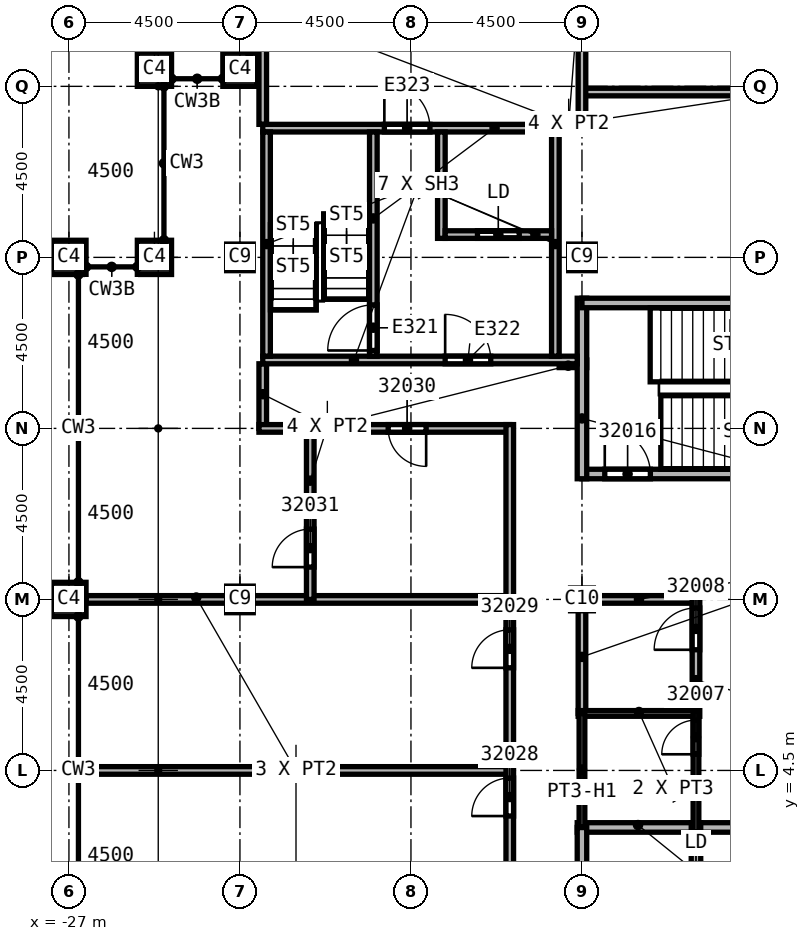
"""IFC4 building model, lengths in metres.
Left out: names, types, materials, properties, quantities, classifications, styles, units other than length and angle.
Written with IfcOpenShell. Run it as: python <this file> out.ifc"""

import sys

from ifc_helpers import new_model, si_unit, direction, frame, frame_2d, origin, origin_2d, place, context, subcontext, project, spatial, rectangle, extrude, element, fill, save


model = new_model("IFC4")
c1 = context("Model", 3, precision=1e-05, world=origin(), true_north=direction((0.0, 1.0)))
c2 = subcontext(c1, "Body", "Model", "MODEL_VIEW")
j1 = project(units=[si_unit("LENGTHUNIT", "METRE"), si_unit("PLANEANGLEUNIT", "RADIAN")], contexts=[c1])
p1 = place(None, origin())
s1 = spatial("IfcSite", under=j1, at=p1, CompositionType="ELEMENT")
p2 = place(p1, origin())
s2 = spatial("IfcBuilding", under=s1, at=p2, CompositionType="ELEMENT")
p3 = place(p2, frame((0.0, 0.0, 356.0)))
s3 = spatial("IfcBuildingStorey", under=s2, at=p3, CompositionType="ELEMENT", Elevation=356.0)
for number, where, z_axis, x_axis in (
    (1, (-13.5, 18.0, 0.0), (0.0, 0.0, 1.0), (1.0, 0.0, 0.0)),
    (2, (-22.5, 9.0, 0.0), (0.0, 0.0, 1.0), (1.0, 0.0, 0.0)),
    (3, (-22.5, 18.0, 0.0), (0.0, 0.0, 1.0), (1.0, 0.0, 0.0)),
):
    element("IfcColumn", number, at=place(p3, frame(where, z_axis=z_axis, x_axis=x_axis)), inside=s3, PredefinedType="COLUMN", context=c2, shape_type="SweptSolid", body=[
        extrude(rectangle(XDim=0.7, YDim=0.7, at=origin_2d()), origin(), (0.0, 0.0, 1.0), 4.6),
    ])
p4 = place(p3, frame((-13.5, 9.0, 0.0), z_axis=(0.0, 0.0, 1.0), x_axis=(1.0, 0.0, 0.0)))
e4 = element("IfcColumn", 4, at=p4, inside=s3, PredefinedType="COLUMN", context=c2, shape_type="SweptSolid", body=[
    extrude(rectangle(XDim=0.6, YDim=0.6, at=origin_2d()), origin(), (0.0, 0.0, 1.0), 4.6),
])
for number, where, z_axis, x_axis in (
    (5, (-27.0, 9.0, 0.0), (0.0, 0.0, 1.0), (0.0, 1.0, 0.0)),
    (6, (-27.0, 18.0, 0.0), (0.0, 0.0, 1.0), (0.0, 1.0, 0.0)),
    (7, (-22.5, 22.95, 0.0), (0.0, 0.0, 1.0), (1.0, 0.0, 0.0)),
    (8, (-24.75, 22.95, 0.0), (0.0, 0.0, 1.0), (1.0, 0.0, 0.0)),
    (9, (-24.75, 18.0, 0.0), (0.0, 0.0, 1.0), (1.0, 0.0, 0.0)),
):
    element("IfcColumn", number, at=place(p3, frame(where, z_axis=z_axis, x_axis=x_axis)), inside=s3, PredefinedType="COLUMN", context=c2, shape_type="SweptSolid", body=[
        extrude(rectangle(XDim=0.9, YDim=0.9, at=origin_2d()), origin(), (0.0, 0.0, 1.0), 4.6),
    ])
for number, where, z_axis, x_axis in (
    (10, (-26.55, 4.5, 0.0), (0.0, 0.0, 1.0), (1.0, 0.0, 0.0)),
    (11, (-26.55, 9.0, 0.0), (0.0, 0.0, 1.0), (1.0, 0.0, 0.0)),
):
    element("IfcWall", number, at=place(p3, frame(where, z_axis=z_axis, x_axis=x_axis)), inside=s3, PredefinedType="PARTITIONING", context=c2, shape_type="SweptSolid", body=[
        extrude(rectangle(XDim=11.15, YDim=0.2, at=frame_2d((5.575, 0.0))), origin(), (0.0, 0.0, 1.0), 4.15),
    ])
p5 = place(p3, frame((-21.9, 13.5, 0.0), z_axis=(0.0, 0.0, 1.0), x_axis=(0.0, 1.0, 0.0)))
e12 = element("IfcWall", 12, at=p5, inside=s3, PredefinedType="PARTITIONING", context=c2, shape_type="SweptSolid", body=[
    extrude(rectangle(XDim=1.7, YDim=0.2, at=frame_2d((0.85, 0.0))), origin(), (0.0, 0.0, 1.0), 4.15),
])
p6 = place(p3, frame((-21.9, 21.5, 0.0), z_axis=(0.0, 0.0, 1.0), x_axis=(0.0, 1.0, 0.0)))
e13 = element("IfcWall", 13, at=p6, inside=s3, PredefinedType="PARTITIONING", context=c2, shape_type="SweptSolid", body=[
    extrude(rectangle(XDim=6.136, YDim=0.2, at=frame_2d((3.068, 0.0))), origin(), (0.0, 0.0, 1.0), 4.15),
])
p7 = place(p3, frame((-20.65, 9.0, 0.0), z_axis=(0.0, 0.0, 1.0), x_axis=(0.0, 1.0, 0.0)))
e14 = element("IfcWall", 14, at=p7, inside=s3, PredefinedType="PARTITIONING", context=c2, shape_type="SweptSolid", body=[
    extrude(rectangle(XDim=4.5, YDim=0.2, at=frame_2d((2.25, 0.0))), origin(), (0.0, 0.0, 1.0), 4.15),
])
p8 = place(p7, frame((0.85, 0.0, 0.0)))
e15 = element("IfcOpeningElement", 15, at=p8, cuts=e14, PredefinedType="OPENING", context=c2, shape_type="SweptSolid", body=[
    extrude(rectangle(XDim=1.0, YDim=2.1, at=frame_2d((0.5, 1.05))), frame((0.0, 0.1, 0.0), z_axis=(0.0, -1.0, 0.0), x_axis=(1.0, 0.0, 0.0)), (0.0, 0.0, 1.0), 0.2),
])
p9 = place(p3, frame((-15.4, 13.5, 0.0), z_axis=(0.0, 0.0, 1.0), x_axis=(-1.0, 0.0, 0.0)))
e16 = element("IfcWall", 16, at=p9, inside=s3, PredefinedType="PARTITIONING", context=c2, shape_type="SweptSolid", body=[
    extrude(rectangle(XDim=6.6, YDim=0.2, at=frame_2d((3.3, 0.0))), origin(), (0.0, 0.0, 1.0), 4.15),
])
p10 = place(p9, frame((2.2, 0.0, 0.0)))
e17 = element("IfcOpeningElement", 17, at=p10, cuts=e16, PredefinedType="OPENING", context=c2, shape_type="SweptSolid", body=[
    extrude(rectangle(XDim=1.0, YDim=2.1, at=frame_2d((0.5, 1.05))), frame((0.0, 0.1, 0.0), z_axis=(0.0, -1.0, 0.0), x_axis=(1.0, 0.0, 0.0)), (0.0, 0.0, 1.0), 0.2),
])
p11 = place(p3, frame((-15.4, -27.636, 0.0), z_axis=(0.0, 0.0, 1.0), x_axis=(0.0, 1.0, 0.0)))
e18 = element("IfcWall", 18, at=p11, inside=s3, PredefinedType="PARTITIONING", context=c2, shape_type="SweptSolid", body=[
    extrude(rectangle(XDim=41.236, YDim=0.2, at=frame_2d((20.618, 0.0))), origin(), (0.0, 0.0, 1.0), 4.15),
])
p12 = place(p11, frame((30.936, 0.0, 0.0)))
e19 = element("IfcOpeningElement", 19, at=p12, cuts=e18, PredefinedType="OPENING", context=c2, shape_type="SweptSolid", body=[
    extrude(rectangle(XDim=1.0, YDim=2.1, at=frame_2d((0.5, 1.05))), frame((0.0, 0.1, 0.0), z_axis=(0.0, -1.0, 0.0), x_axis=(1.0, 0.0, 0.0)), (0.0, 0.0, 1.0), 0.2),
])
p13 = place(p11, frame((34.836, 0.0, 0.0)))
e20 = element("IfcOpeningElement", 20, at=p13, cuts=e18, PredefinedType="OPENING", context=c2, shape_type="SweptSolid", body=[
    extrude(rectangle(XDim=1.0, YDim=2.1, at=frame_2d((0.5, 1.05))), frame((0.0, 0.1, 0.0), z_axis=(0.0, -1.0, 0.0), x_axis=(1.0, 0.0, 0.0)), (0.0, 0.0, 1.0), 0.2),
])
p14 = place(p11, frame((8.2, 0.0, 0.0)))
e21 = element("IfcOpeningElement", 21, at=p14, cuts=e18, PredefinedType="OPENING", context=c2, shape_type="SweptSolid", body=[
    extrude(rectangle(XDim=1.0, YDim=2.1, at=frame_2d((0.5, 1.05))), frame((0.0, 0.1, 0.0), z_axis=(0.0, -1.0, 0.0), x_axis=(1.0, 0.0, 0.0)), (0.0, 0.0, 1.0), 0.2),
])
p15 = place(p11, frame((22.986, 0.0, 0.0)))
e22 = element("IfcOpeningElement", 22, at=p15, cuts=e18, PredefinedType="OPENING", context=c2, shape_type="SweptSolid", body=[
    extrude(rectangle(XDim=1.0, YDim=2.1, at=frame_2d((0.5, 1.05))), frame((0.0, 0.1, 0.0), z_axis=(0.0, -1.0, 0.0), x_axis=(1.0, 0.0, 0.0)), (0.0, 0.0, 1.0), 0.2),
])
p16 = place(p11, frame((26.361, 0.0, 0.0)))
e23 = element("IfcOpeningElement", 23, at=p16, cuts=e18, PredefinedType="OPENING", context=c2, shape_type="SweptSolid", body=[
    extrude(rectangle(XDim=1.0, YDim=2.1, at=frame_2d((0.5, 1.05))), frame((0.0, 0.1, 0.0), z_axis=(0.0, -1.0, 0.0), x_axis=(1.0, 0.0, 0.0)), (0.0, 0.0, 1.0), 0.2),
])
p17 = place(p3, frame((-14.1, 15.2, 0.0), z_axis=(0.0, 0.0, 1.0), x_axis=(1.0, 0.0, 0.0)))
e24 = element("IfcWall", 24, at=p17, inside=s3, PredefinedType="PARTITIONING", context=c2, shape_type="SweptSolid", body=[
    extrude(rectangle(XDim=0.725, YDim=0.2, at=frame_2d((0.363, 0.0))), origin(), (0.0, 0.0, 1.0), 4.15),
])
p18 = place(p3, frame((-13.5, 21.5, 0.0), z_axis=(0.0, 0.0, 1.0), x_axis=(-1.0, 0.0, 0.0)))
e25 = element("IfcWall", 25, at=p18, inside=s3, PredefinedType="PARTITIONING", context=c2, shape_type="SweptSolid", body=[
    extrude(rectangle(XDim=0.6, YDim=0.2, at=frame_2d((0.3, 0.0))), origin(), (0.0, 0.0, 1.0), 4.15),
])
p19 = place(p3, frame((-13.5, 22.35, 0.0), z_axis=(0.0, 0.0, 1.0), x_axis=(1.0, 0.0, 0.0)))
e26 = element("IfcWall", 26, at=p19, inside=s3, PredefinedType="PARTITIONING", context=c2, shape_type="SweptSolid", body=[
    extrude(rectangle(XDim=10.6, YDim=0.2, at=frame_2d((5.3, 0.0))), origin(), (0.0, 0.0, 1.0), 4.15),
])
p20 = place(p3, frame((-13.5, 27.45, 0.0), z_axis=(0.0, 0.0, 1.0), x_axis=(0.0, -1.0, 0.0)))
e27 = element("IfcWall", 27, at=p20, inside=s3, PredefinedType="PARTITIONING", context=c2, shape_type="SweptSolid", body=[
    extrude(rectangle(XDim=6.05, YDim=0.2, at=frame_2d((3.025, 0.0))), origin(), (0.0, 0.0, 1.0), 4.15),
])
p21 = place(p20, frame((2.95, 0.0, 0.0)))
e28 = element("IfcOpeningElement", 28, at=p21, cuts=e27, PredefinedType="OPENING", context=c2, shape_type="SweptSolid", body=[
    extrude(rectangle(XDim=1.0, YDim=2.1, at=frame_2d((0.5, 1.05))), frame((0.0, 0.1, 0.0), z_axis=(0.0, -1.0, 0.0), x_axis=(1.0, 0.0, 0.0)), (0.0, 0.0, 1.0), 0.2),
])
p22 = place(p3, frame((-13.5, 6.0, 0.0), z_axis=(0.0, 0.0, 1.0), x_axis=(0.0, 1.0, 0.0)))
e29 = element("IfcWall", 29, at=p22, inside=s3, PredefinedType="SOLIDWALL", context=c2, shape_type="SweptSolid", body=[
    extrude(rectangle(XDim=3.1, YDim=0.2, at=frame_2d((1.55, 0.0))), origin(), (0.0, 0.0, 1.0), 3.838),
])
p23 = place(p3, frame((-13.5, 9.0, 0.0), z_axis=(0.0, 0.0, 1.0), x_axis=(1.0, 0.0, 0.0)))
e30 = element("IfcWall", 30, at=p23, inside=s3, PredefinedType="SOLIDWALL", context=c2, shape_type="SweptSolid", body=[
    extrude(rectangle(XDim=3.0, YDim=0.2, at=frame_2d((1.5, 0.0))), origin(), (0.0, 0.0, 1.0), 3.838),
])
p24 = place(p3, frame((-10.5, 5.925, 0.0), z_axis=(0.0, 0.0, 1.0), x_axis=(0.0, 1.0, 0.0)))
e31 = element("IfcWall", 31, at=p24, inside=s3, PredefinedType="SOLIDWALL", context=c2, shape_type="SweptSolid", body=[
    extrude(rectangle(XDim=3.175, YDim=0.2, at=frame_2d((1.587, 0.0))), origin(), (0.0, 0.0, 1.0), 4.15),
])
p25 = place(p24, frame((1.75, 0.0, 0.0)))
e32 = element("IfcOpeningElement", 32, at=p25, cuts=e31, PredefinedType="OPENING", context=c2, shape_type="SweptSolid", body=[
    extrude(rectangle(XDim=1.1, YDim=2.1, at=frame_2d((0.55, 1.05))), frame((0.0, 0.1, 0.0), z_axis=(0.0, -1.0, 0.0), x_axis=(1.0, 0.0, 0.0)), (0.0, 0.0, 1.0), 0.2),
])
p26 = place(p3, frame((-13.625, 3.0, 0.0), z_axis=(0.0, 0.0, 1.0), x_axis=(1.0, 0.0, 0.0)))
e33 = element("IfcWall", 33, at=p26, inside=s3, PredefinedType="SOLIDWALL", context=c2, shape_type="SweptSolid", body=[
    extrude(rectangle(XDim=6.125, YDim=0.25, at=frame_2d((3.062, 0.0))), origin(), (0.0, 0.0, 1.0), 4.15),
])
p27 = place(p26, frame((4.75, 0.0, 0.0)))
e34 = element("IfcOpeningElement", 34, at=p27, cuts=e33, PredefinedType="OPENING", context=c2, shape_type="SweptSolid", body=[
    extrude(rectangle(XDim=1.1, YDim=2.1, at=frame_2d((0.55, 1.05))), frame((0.0, 0.125, 0.0), z_axis=(0.0, -1.0, 0.0), x_axis=(1.0, 0.0, 0.0)), (0.0, 0.0, 1.0), 0.25),
])
p28 = place(p3, frame((-13.5, -3.0, 0.0), z_axis=(0.0, 0.0, 1.0), x_axis=(0.0, 1.0, 0.0)))
e35 = element("IfcWall", 35, at=p28, inside=s3, PredefinedType="SOLIDWALL", context=c2, shape_type="SweptSolid", body=[
    extrude(rectangle(XDim=6.0, YDim=0.25, at=frame_2d((3.0, 0.0))), origin(), (0.0, 0.0, 1.0), 3.838),
])
p29 = place(p3, frame((-10.5, -3.125, 0.0), z_axis=(0.0, 0.0, 1.0), x_axis=(0.0, 1.0, 0.0)))
e36 = element("IfcWall", 36, at=p29, inside=s3, PredefinedType="SOLIDWALL", context=c2, shape_type="SweptSolid", body=[
    extrude(rectangle(XDim=6.25, YDim=0.25, at=frame_2d((3.125, 0.0))), origin(), (0.0, 0.0, 1.0), 4.15),
])
p30 = place(p29, frame((1.075, 0.0, 0.0)))
e37 = element("IfcOpeningElement", 37, at=p30, cuts=e36, PredefinedType="OPENING", context=c2, shape_type="SweptSolid", body=[
    extrude(rectangle(XDim=1.1, YDim=2.1, at=frame_2d((0.55, 1.05))), frame((0.0, 0.125, 0.0), z_axis=(0.0, -1.0, 0.0), x_axis=(1.0, 0.0, 0.0)), (0.0, 0.0, 1.0), 0.25),
])
p31 = place(p29, frame((4.075, 0.0, 0.0)))
e38 = element("IfcOpeningElement", 38, at=p31, cuts=e36, PredefinedType="OPENING", context=c2, shape_type="SweptSolid", body=[
    extrude(rectangle(XDim=1.1, YDim=2.1, at=frame_2d((0.55, 1.05))), frame((0.0, 0.125, 0.0), z_axis=(0.0, -1.0, 0.0), x_axis=(1.0, 0.0, 0.0)), (0.0, 0.0, 1.0), 0.25),
])
p32 = place(p3, frame((-13.5, 12.3, 0.0), z_axis=(0.0, 0.0, 1.0), x_axis=(1.0, 0.0, 0.0)))
e39 = element("IfcWall", 39, at=p32, inside=s3, PredefinedType="SOLIDWALL", context=c2, shape_type="SweptSolid", body=[
    extrude(rectangle(XDim=9.125, YDim=0.25, at=frame_2d((4.562, 0.0))), origin(), (0.0, 0.0, 1.0), 4.15),
])
p33 = place(p32, frame((0.6, 0.0, 0.0)))
e40 = element("IfcOpeningElement", 40, at=p33, cuts=e39, PredefinedType="OPENING", context=c2, shape_type="SweptSolid", body=[
    extrude(rectangle(XDim=1.2, YDim=2.1, at=frame_2d((0.6, 1.05))), frame((0.0, 0.125, 0.0), z_axis=(0.0, -1.0, 0.0), x_axis=(1.0, 0.0, 0.0)), (0.0, 0.0, 1.0), 0.25),
])
p34 = place(p3, frame((-13.5, 12.175, 0.0), z_axis=(0.0, 0.0, 1.0), x_axis=(0.0, 1.0, 0.0)))
e41 = element("IfcWall", 41, at=p34, inside=s3, PredefinedType="SOLIDWALL", context=c2, shape_type="SweptSolid", body=[
    extrude(rectangle(XDim=4.75, YDim=0.25, at=frame_2d((2.375, 0.0))), origin(), (0.0, 0.0, 1.0), 4.15),
])
p35 = place(p3, frame((-13.5, 16.8, 0.0), z_axis=(0.0, 0.0, 1.0), x_axis=(1.0, 0.0, 0.0)))
e42 = element("IfcWall", 42, at=p35, inside=s3, PredefinedType="SOLIDWALL", context=c2, shape_type="SweptSolid", body=[
    extrude(rectangle(XDim=9.1, YDim=0.25, at=frame_2d((4.55, 0.0))), origin(), (0.0, 0.0, 1.0), 4.15),
])
p36 = place(p3, frame((-13.6, 6.0, 0.0), z_axis=(0.0, 0.0, 1.0), x_axis=(1.0, 0.0, 0.0)))
e43 = element("IfcWall", 43, at=p36, inside=s3, PredefinedType="PARTITIONING", context=c2, shape_type="SweptSolid", body=[
    extrude(rectangle(XDim=3.1, YDim=0.15, at=frame_2d((1.55, 0.0))), origin(), (0.0, 0.0, 1.0), 4.15),
])
p37 = place(p3, frame((-13.5, 3.0, 0.0), z_axis=(0.0, 0.0, 1.0), x_axis=(0.0, 1.0, 0.0)))
e44 = element("IfcWall", 44, at=p37, inside=s3, PredefinedType="PARTITIONING", context=c2, shape_type="SweptSolid", body=[
    extrude(rectangle(XDim=3.0, YDim=0.15, at=frame_2d((1.5, 0.0))), origin(), (0.0, 0.0, 1.0), 3.838),
])
p38 = place(p3, frame((-10.5, 2.875, 0.0), z_axis=(0.0, 0.0, 1.0), x_axis=(0.0, 1.0, 0.0)))
e45 = element("IfcWall", 45, at=p38, inside=s3, PredefinedType="PARTITIONING", context=c2, shape_type="SweptSolid", body=[
    extrude(rectangle(XDim=3.2, YDim=0.15, at=frame_2d((1.6, 0.0))), origin(), (0.0, 0.0, 1.0), 4.15),
])
p39 = place(p38, frame((2.05, 0.0, 0.0)))
e46 = element("IfcOpeningElement", 46, at=p39, cuts=e45, PredefinedType="OPENING", context=c2, shape_type="SweptSolid", body=[
    extrude(rectangle(XDim=0.9, YDim=2.1, at=frame_2d((0.45, 1.05))), frame((0.0, 0.075, 0.0), z_axis=(0.0, -1.0, 0.0), x_axis=(1.0, 0.0, 0.0)), (0.0, 0.0, 1.0), 0.15),
])
p40 = place(p3, frame((-21.9, 15.3, 0.0), z_axis=(0.0, 0.0, 1.0), x_axis=(1.0, 0.0, 0.0)))
e47 = element("IfcWall", 47, at=p40, inside=s3, PredefinedType="SOLIDWALL", context=c2, shape_type="SweptSolid", body=[
    extrude(rectangle(XDim=8.275, YDim=0.2, at=frame_2d((4.137, 0.0))), origin(), (0.0, 0.0, 1.0), 4.15),
])
p41 = place(p40, frame((4.8, 0.0, 0.0)))
e48 = element("IfcOpeningElement", 48, at=p41, cuts=e47, PredefinedType="OPENING", context=c2, shape_type="SweptSolid", body=[
    extrude(rectangle(XDim=1.2, YDim=2.1, at=frame_2d((0.6, 1.05))), frame((0.0, 0.1, 0.0), z_axis=(0.0, -1.0, 0.0), x_axis=(1.0, 0.0, 0.0)), (0.0, 0.0, 1.0), 0.2),
])
p42 = place(p3, frame((-21.9, 21.4, 0.0), z_axis=(0.0, 0.0, 1.0), x_axis=(1.0, 0.0, 0.0)))
e49 = element("IfcWall", 49, at=p42, inside=s3, PredefinedType="SOLIDWALL", context=c2, shape_type="SweptSolid", body=[
    extrude(rectangle(XDim=7.8, YDim=0.2, at=frame_2d((3.9, 0.0))), origin(), (0.0, 0.0, 1.0), 4.15),
])
p43 = place(p42, frame((3.2, 0.0, 0.0)))
e50 = element("IfcOpeningElement", 50, at=p43, cuts=e49, PredefinedType="OPENING", context=c2, shape_type="SweptSolid", body=[
    extrude(rectangle(XDim=1.2, YDim=2.1, at=frame_2d((0.6, 1.05))), frame((0.0, 0.1, 0.0), z_axis=(0.0, -1.0, 0.0), x_axis=(1.0, 0.0, 0.0)), (0.0, 0.0, 1.0), 0.2),
])
for number, where, z_axis, x_axis in (
    (51, (-21.8, 15.4, 0.0), (0.0, 0.0, 1.0), (0.0, 1.0, 0.0)),
    (52, (-14.2, 15.4, 0.0), (0.0, 0.0, 1.0), (0.0, 1.0, 0.0)),
):
    element("IfcWall", number, at=place(p3, frame(where, z_axis=z_axis, x_axis=x_axis)), inside=s3, PredefinedType="SOLIDWALL", context=c2, shape_type="SweptSolid", body=[
        extrude(rectangle(XDim=5.9, YDim=0.2, at=frame_2d((2.95, 0.0))), origin(), (0.0, 0.0, 1.0), 4.15),
    ])
p44 = place(p3, frame((-18.99, 15.4, 0.0), z_axis=(0.0, 0.0, 1.0), x_axis=(0.0, 1.0, 0.0)))
e53 = element("IfcWall", 53, at=p44, inside=s3, PredefinedType="SOLIDWALL", context=c2, shape_type="SweptSolid", body=[
    extrude(rectangle(XDim=5.9, YDim=0.2, at=frame_2d((2.95, 0.0))), origin(), (0.0, 0.0, 1.0), 4.15),
])
p45 = place(p44, frame((0.15, 0.0, 0.0)))
e54 = element("IfcOpeningElement", 54, at=p45, cuts=e53, PredefinedType="OPENING", context=c2, shape_type="SweptSolid", body=[
    extrude(rectangle(XDim=1.2, YDim=2.1, at=frame_2d((0.6, 1.05))), frame((0.0, 0.1, 0.0), z_axis=(0.0, -1.0, 0.0), x_axis=(1.0, 0.0, 0.0)), (0.0, 0.0, 1.0), 0.2),
])
p46 = place(p3, frame((-17.2, 18.5, 0.0), z_axis=(0.0, 0.0, 1.0), x_axis=(0.0, 1.0, 0.0)))
e55 = element("IfcWall", 55, at=p46, inside=s3, PredefinedType="SOLIDWALL", context=c2, shape_type="SweptSolid", body=[
    extrude(rectangle(XDim=2.8, YDim=0.2, at=frame_2d((1.4, 0.0))), origin(), (0.0, 0.0, 1.0), 4.15),
])
p47 = place(p3, frame((-17.1, 18.6, 0.0), z_axis=(0.0, 0.0, 1.0), x_axis=(1.0, 0.0, 0.0)))
e56 = element("IfcWall", 56, at=p47, inside=s3, PredefinedType="SOLIDWALL", context=c2, shape_type="SweptSolid", body=[
    extrude(rectangle(XDim=2.8, YDim=0.2, at=frame_2d((1.4, 0.0))), origin(), (0.0, 0.0, 1.0), 4.15),
])
p48 = place(p47, frame((0.85, 0.0, 0.0)))
e57 = element("IfcOpeningElement", 57, at=p48, cuts=e56, PredefinedType="OPENING", context=c2, shape_type="SweptSolid", body=[
    extrude(rectangle(XDim=1.1, YDim=2.1, at=frame_2d((0.55, 1.05))), frame((0.0, 0.1, 0.0), z_axis=(0.0, -1.0, 0.0), x_axis=(1.0, 0.0, 0.0)), (0.0, 0.0, 1.0), 0.2),
])
p49 = place(p39, origin())
e58 = element("IfcDoor", 58, at=p49, inside=s3, OperationType="SINGLE_SWING_RIGHT", PredefinedType="DOOR", context=c2, shape_type="SweptSolid", body=[
    extrude(rectangle(XDim=0.9, YDim=2.1, at=frame_2d((0.45, 1.05))), frame((0.0, 0.025, 0.0), z_axis=(0.0, -1.0, 0.0), x_axis=(1.0, 0.0, 0.0)), (0.0, 0.0, 1.0), 0.05),
])
fill(e46, e58)
p50 = place(p25, origin())
e59 = element("IfcDoor", 59, at=p50, inside=s3, OperationType="SINGLE_SWING_LEFT", PredefinedType="DOOR", context=c2, shape_type="SweptSolid", body=[
    extrude(rectangle(XDim=1.1, YDim=2.1, at=frame_2d((0.55, 1.05))), frame((0.0, 0.025, 0.0), z_axis=(0.0, -1.0, 0.0), x_axis=(1.0, 0.0, 0.0)), (0.0, 0.0, 1.0), 0.05),
])
fill(e32, e59)
p51 = place(p33, origin())
e60 = element("IfcDoor", 60, at=p51, inside=s3, OperationType="SINGLE_SWING_LEFT", PredefinedType="DOOR", context=c2, shape_type="SweptSolid", body=[
    extrude(rectangle(XDim=1.2, YDim=2.1, at=frame_2d((0.6, 1.05))), frame((0.0, 0.025, 0.0), z_axis=(0.0, -1.0, 0.0), x_axis=(1.0, 0.0, 0.0)), (0.0, 0.0, 1.0), 0.05),
])
fill(e40, e60)
p52 = place(p12, origin())
e61 = element("IfcDoor", 61, at=p52, inside=s3, OperationType="SINGLE_SWING_LEFT", PredefinedType="DOOR", context=c2, shape_type="SweptSolid", body=[
    extrude(rectangle(XDim=1.0, YDim=2.1, at=frame_2d((0.5, 1.05))), frame((0.0, 0.025, 0.0), z_axis=(0.0, -1.0, 0.0), x_axis=(1.0, 0.0, 0.0)), (0.0, 0.0, 1.0), 0.05),
])
fill(e19, e61)
p53 = place(p13, origin())
e62 = element("IfcDoor", 62, at=p53, inside=s3, OperationType="SINGLE_SWING_RIGHT", PredefinedType="DOOR", context=c2, shape_type="SweptSolid", body=[
    extrude(rectangle(XDim=1.0, YDim=2.1, at=frame_2d((0.5, 1.05))), frame((0.0, 0.025, 0.0), z_axis=(0.0, -1.0, 0.0), x_axis=(1.0, 0.0, 0.0)), (0.0, 0.0, 1.0), 0.05),
])
fill(e20, e62)
p54 = place(p10, origin())
e63 = element("IfcDoor", 63, at=p54, inside=s3, OperationType="SINGLE_SWING_LEFT", PredefinedType="DOOR", context=c2, shape_type="SweptSolid", body=[
    extrude(rectangle(XDim=1.0, YDim=2.1, at=frame_2d((0.5, 1.05))), frame((0.0, 0.025, 0.0), z_axis=(0.0, -1.0, 0.0), x_axis=(1.0, 0.0, 0.0)), (0.0, 0.0, 1.0), 0.05),
])
fill(e17, e63)
p55 = place(p8, origin())
e64 = element("IfcDoor", 64, at=p55, inside=s3, OperationType="SINGLE_SWING_RIGHT", PredefinedType="DOOR", context=c2, shape_type="SweptSolid", body=[
    extrude(rectangle(XDim=1.0, YDim=2.1, at=frame_2d((0.5, 1.05))), frame((0.0, 0.025, 0.0), z_axis=(0.0, -1.0, 0.0), x_axis=(1.0, 0.0, 0.0)), (0.0, 0.0, 1.0), 0.05),
])
fill(e15, e64)
p56 = place(p45, origin())
e65 = element("IfcDoor", 65, at=p56, inside=s3, OperationType="SINGLE_SWING_LEFT", PredefinedType="DOOR", context=c2, shape_type="SweptSolid", body=[
    extrude(rectangle(XDim=1.2, YDim=2.1, at=frame_2d((0.6, 1.05))), frame((0.0, 0.025, 0.0), z_axis=(0.0, -1.0, 0.0), x_axis=(1.0, 0.0, 0.0)), (0.0, 0.0, 1.0), 0.05),
])
fill(e54, e65)
p57 = place(p48, origin())
e66 = element("IfcDoor", 66, at=p57, inside=s3, OperationType="SLIDING_TO_LEFT", PredefinedType="DOOR", context=c2, shape_type="SweptSolid", body=[
    extrude(rectangle(XDim=1.1, YDim=2.1, at=frame_2d((0.55, 1.05))), frame((0.0, 0.025, 0.0), z_axis=(0.0, -1.0, 0.0), x_axis=(1.0, 0.0, 0.0)), (0.0, 0.0, 1.0), 0.05),
])
fill(e57, e66)
p58 = place(p41, origin())
e67 = element("IfcDoor", 67, at=p58, inside=s3, OperationType="SINGLE_SWING_RIGHT", PredefinedType="DOOR", context=c2, shape_type="SweptSolid", body=[
    extrude(rectangle(XDim=1.2, YDim=2.1, at=frame_2d((0.6, 1.05))), frame((0.0, 0.025, 0.0), z_axis=(0.0, -1.0, 0.0), x_axis=(1.0, 0.0, 0.0)), (0.0, 0.0, 1.0), 0.05),
])
fill(e48, e67)
p59 = place(p43, origin())
e68 = element("IfcDoor", 68, at=p59, inside=s3, OperationType="SINGLE_SWING_LEFT", PredefinedType="DOOR", context=c2, shape_type="SweptSolid", body=[
    extrude(rectangle(XDim=1.2, YDim=2.1, at=frame_2d((0.6, 1.05))), frame((0.0, 0.025, 0.0), z_axis=(0.0, -1.0, 0.0), x_axis=(1.0, 0.0, 0.0)), (0.0, 0.0, 1.0), 0.05),
])
fill(e50, e68)
save(model, sys.argv[1])
